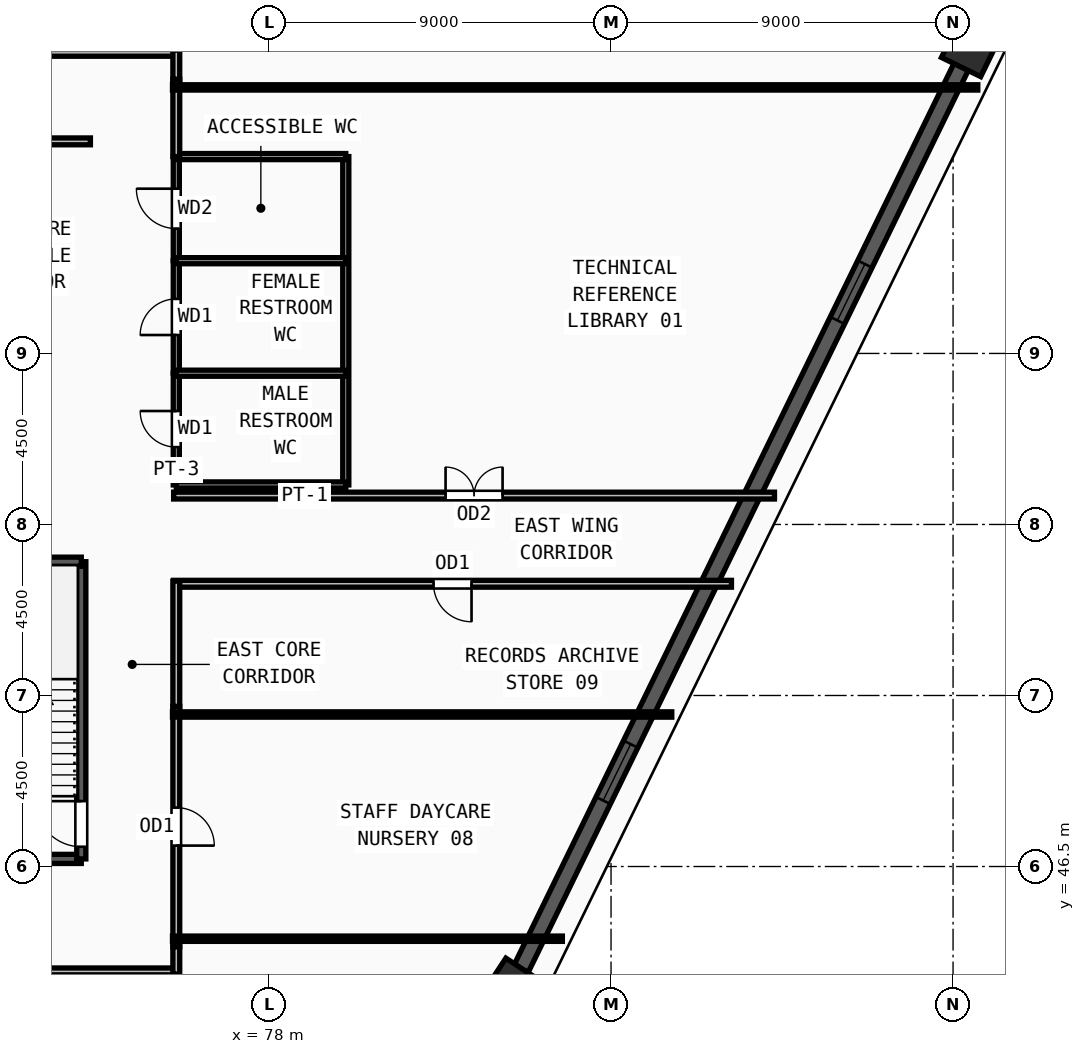
"""IFC4 building model, lengths in metres.
Left out: names, types, materials, properties, quantities, classifications, styles, units other than length and angle.
Written with IfcOpenShell. Run it as: python <this file> out.ifc"""

import sys

from ifc_helpers import new_model, si_unit, direction, frame, frame_2d, origin, origin_2d, place, context, subcontext, project, spatial, rectangle, extrude, source, transform, mapped, element, fill, save


model = new_model("IFC4")
c1 = context("Model", 3, precision=1e-05, world=origin(), true_north=direction((0.0, 1.0)))
c2 = subcontext(c1, "Body", "Model", "MODEL_VIEW")
j1 = project(units=[si_unit("LENGTHUNIT", "METRE"), si_unit("PLANEANGLEUNIT", "RADIAN")], contexts=[c1])
p1 = place(None, origin())
s1 = spatial("IfcSite", under=j1, at=p1, CompositionType="ELEMENT")
p2 = place(p1, origin())
s2 = spatial("IfcBuilding", under=s1, at=p2, CompositionType="ELEMENT")
p3 = place(p2, frame((0.0, 0.0, 113.25)))
s3 = spatial("IfcBuildingStorey", under=s2, at=p3, CompositionType="ELEMENT", Elevation=113.25)
m1 = source(origin(), c2, "Body", "SweptSolid", [
    extrude(rectangle(XDim=1.4, YDim=1.15, at=origin_2d()), origin(), (0.0, 0.0, 1.0), 3.75),
])
for number, where, z_axis, x_axis in (
    (1, (96.518, 68.165, 0.0), (0.0, 0.0, 1.0), (0.439, 0.899, 0.0)),
    (2, (84.329, 43.188, 0.0), (0.0, 0.0, 1.0), (0.549, 0.836, 0.0)),
):
    element("IfcColumn", number, at=place(p3, frame(where, z_axis=z_axis, x_axis=x_axis)), inside=s3, PredefinedType="COLUMN", context=c2, shape_type="MappedRepresentation", body=[
        mapped(m1, transform((0.0, 0.0, 0.0), x_axis=(1.0, 0.0, 0.0), y_axis=(0.0, 1.0, 0.0), z_axis=(0.0, 0.0, 1.0), scale=1.0)),
    ])
p4 = place(p3, frame((84.632, 43.808, 0.0), z_axis=(0.0, 0.0, 1.0), x_axis=(0.43854819507, 0.898707672495, 0.0)))
e3 = element("IfcWall", 3, at=p4, inside=s3, PredefinedType="SOLIDWALL", context=c2, shape_type="SweptSolid", body=[
    extrude(rectangle(XDim=26.412, YDim=0.42, at=frame_2d((13.206, 0.0))), origin(), (0.0, 0.0, 1.0), 3.57),
])
m2 = source(origin(), c2, "Body", "SweptSolid", [
    extrude(rectangle(XDim=1.65, YDim=1.95, at=frame_2d((0.825, 0.975))), frame((0.0, 0.22, 0.0), z_axis=(0.0, -1.0, 0.0), x_axis=(1.0, 0.0, 0.0)), (0.0, 0.0, 1.0), 0.44),
])
p5 = place(p4, frame((4.928, 0.0, 0.55)))
e4 = element("IfcOpeningElement", 4, at=p5, cuts=e3, PredefinedType="OPENING", context=c2, shape_type="MappedRepresentation", body=[
    mapped(m2, transform((0.0, 0.0, 0.0), x_axis=(1.0, 0.0, 0.0), y_axis=(0.0, 1.0, 0.0), z_axis=(0.0, 0.0, 1.0), scale=1.0)),
])
p6 = place(p4, frame((18.984, 0.0, 0.55)))
e5 = element("IfcOpeningElement", 5, at=p6, cuts=e3, PredefinedType="OPENING", context=c2, shape_type="MappedRepresentation", body=[
    mapped(m2, transform((0.0, 0.0, 0.0), x_axis=(1.0, 0.0, 0.0), y_axis=(0.0, 1.0, 0.0), z_axis=(0.0, 0.0, 1.0), scale=1.0)),
])
p7 = place(p3, frame((69.62, 46.7, 0.0), z_axis=(0.0, 0.0, 1.0), x_axis=(1.0, 0.0, 0.0)))
e6 = element("IfcWall", 6, at=p7, inside=s3, PredefinedType="SOLIDWALL", context=c2, shape_type="SweptSolid", body=[
    extrude(rectangle(XDim=3.44, YDim=0.24, at=frame_2d((1.72, 0.0))), origin(), (0.0, 0.0, 1.0), 3.57),
])
p8 = place(p3, frame((73.06, 46.7, 0.0), z_axis=(0.0, 0.0, 1.0), x_axis=(0.0, 1.0, 0.0)))
e7 = element("IfcWall", 7, at=p8, inside=s3, PredefinedType="SOLIDWALL", context=c2, shape_type="SweptSolid", body=[
    extrude(rectangle(XDim=7.82, YDim=0.24, at=frame_2d((3.91, 0.0))), origin(), (0.0, 0.0, 1.0), 3.57),
])
m3 = source(origin(), c2, "Body", "SweptSolid", [
    extrude(rectangle(XDim=1.2, YDim=2.2, at=frame_2d((0.6, 1.1))), frame((0.0, 0.13, 0.0), z_axis=(0.0, -1.0, 0.0), x_axis=(1.0, 0.0, 0.0)), (0.0, 0.0, 1.0), 0.26),
])
p9 = place(p8, frame((0.32, 0.0, 0.0)))
e8 = element("IfcOpeningElement", 8, at=p9, cuts=e7, PredefinedType="OPENING", context=c2, shape_type="MappedRepresentation", body=[
    mapped(m3, transform((0.0, 0.0, 0.0), x_axis=(1.0, 0.0, 0.0), y_axis=(0.0, 1.0, 0.0), z_axis=(0.0, 0.0, 1.0), scale=1.0)),
])
p10 = place(p3, frame((73.06, 54.52, 0.0), z_axis=(0.0, 0.0, 1.0), x_axis=(-1.0, 0.0, 0.0)))
e9 = element("IfcWall", 9, at=p10, inside=s3, PredefinedType="SOLIDWALL", context=c2, shape_type="SweptSolid", body=[
    extrude(rectangle(XDim=3.44, YDim=0.24, at=frame_2d((1.72, 0.0))), origin(), (0.0, 0.0, 1.0), 3.57),
])
p11 = place(p3, frame((75.56, 56.54, 0.0), z_axis=(0.0, 0.0, 1.0), x_axis=(0.0, 1.0, 0.0)))
e10 = element("IfcWall", 10, at=p11, inside=s3, PredefinedType="PARTITIONING", context=c2, shape_type="SweptSolid", body=[
    extrude(rectangle(XDim=2.94, YDim=0.16, at=frame_2d((1.47, 0.0))), origin(), (0.0, 0.0, 1.0), 3.57),
])
m4 = source(origin(), c2, "Body", "SweptSolid", [
    extrude(rectangle(XDim=0.95, YDim=2.15, at=frame_2d((0.475, 1.075))), frame((0.0, 0.09, 0.0), z_axis=(0.0, -1.0, 0.0), x_axis=(1.0, 0.0, 0.0)), (0.0, 0.0, 1.0), 0.18),
])
p12 = place(p11, frame((0.995, 0.0, 0.0)))
e11 = element("IfcOpeningElement", 11, at=p12, cuts=e10, PredefinedType="OPENING", context=c2, shape_type="MappedRepresentation", body=[
    mapped(m4, transform((0.0, 0.0, 0.0), x_axis=(1.0, 0.0, 0.0), y_axis=(0.0, 1.0, 0.0), z_axis=(0.0, 0.0, 1.0), scale=1.0)),
])
p13 = place(p3, frame((75.56, 59.48, 0.0), z_axis=(0.0, 0.0, 1.0), x_axis=(0.0, 1.0, 0.0)))
e12 = element("IfcWall", 12, at=p13, inside=s3, PredefinedType="PARTITIONING", context=c2, shape_type="SweptSolid", body=[
    extrude(rectangle(XDim=2.96, YDim=0.16, at=frame_2d((1.48, 0.0))), origin(), (0.0, 0.0, 1.0), 3.57),
])
p14 = place(p13, frame((1.005, 0.0, 0.0)))
e13 = element("IfcOpeningElement", 13, at=p14, cuts=e12, PredefinedType="OPENING", context=c2, shape_type="MappedRepresentation", body=[
    mapped(m4, transform((0.0, 0.0, 0.0), x_axis=(1.0, 0.0, 0.0), y_axis=(0.0, 1.0, 0.0), z_axis=(0.0, 0.0, 1.0), scale=1.0)),
])
p15 = place(p3, frame((75.56, 62.44, 0.0), z_axis=(0.0, 0.0, 1.0), x_axis=(0.0, 1.0, 0.0)))
e14 = element("IfcWall", 14, at=p15, inside=s3, PredefinedType="PARTITIONING", context=c2, shape_type="SweptSolid", body=[
    extrude(rectangle(XDim=2.74, YDim=0.16, at=frame_2d((1.37, 0.0))), origin(), (0.0, 0.0, 1.0), 3.57),
])
m5 = source(origin(), c2, "Body", "SweptSolid", [
    extrude(rectangle(XDim=1.05, YDim=2.15, at=frame_2d((0.525, 1.075))), frame((0.0, 0.09, 0.0), z_axis=(0.0, -1.0, 0.0), x_axis=(1.0, 0.0, 0.0)), (0.0, 0.0, 1.0), 0.18),
])
p16 = place(p15, frame((0.845, 0.0, 0.0)))
e15 = element("IfcOpeningElement", 15, at=p16, cuts=e14, PredefinedType="OPENING", context=c2, shape_type="MappedRepresentation", body=[
    mapped(m5, transform((0.0, 0.0, 0.0), x_axis=(1.0, 0.0, 0.0), y_axis=(0.0, 1.0, 0.0), z_axis=(0.0, 0.0, 1.0), scale=1.0)),
])
p17 = place(p3, frame((69.46, 65.58, 0.0), z_axis=(0.0, 0.0, 1.0), x_axis=(1.0, 0.0, 0.0)))
e16 = element("IfcWall", 16, at=p17, inside=s3, PredefinedType="PARTITIONING", context=c2, shape_type="SweptSolid", body=[
    extrude(rectangle(XDim=3.84, YDim=0.18, at=frame_2d((1.92, 0.0))), origin(), (0.0, 0.0, 1.0), 3.57),
])
m6 = source(origin(), c2, "Body", "SweptSolid", [
    extrude(rectangle(XDim=1.3, YDim=2.2, at=frame_2d((0.65, 1.1))), frame((0.0, 0.1, 0.0), z_axis=(0.0, -1.0, 0.0), x_axis=(1.0, 0.0, 0.0)), (0.0, 0.0, 1.0), 0.2),
])
p18 = place(p17, frame((1.27, 0.0, 0.0)))
e17 = element("IfcOpeningElement", 17, at=p18, cuts=e16, PredefinedType="OPENING", context=c2, shape_type="MappedRepresentation", body=[
    mapped(m6, transform((0.0, 0.0, 0.0), x_axis=(1.0, 0.0, 0.0), y_axis=(0.0, 1.0, 0.0), z_axis=(0.0, 0.0, 1.0), scale=1.0)),
])
p19 = place(p3, frame((75.49, 56.26, 0.0), z_axis=(0.0, 0.0, 1.0), x_axis=(1.0, 0.0, 0.0)))
e18 = element("IfcWall", 18, at=p19, inside=s3, PredefinedType="PARTITIONING", context=c2, shape_type="SweptSolid", body=[
    extrude(rectangle(XDim=15.811, YDim=0.18, at=frame_2d((7.906, 0.0))), origin(), (0.0, 0.0, 1.0), 3.57),
])
m7 = source(origin(), c2, "Body", "SweptSolid", [
    extrude(rectangle(XDim=1.5, YDim=2.2, at=frame_2d((0.75, 1.1))), frame((0.0, 0.1, 0.0), z_axis=(0.0, -1.0, 0.0), x_axis=(1.0, 0.0, 0.0)), (0.0, 0.0, 1.0), 0.2),
])
p20 = place(p19, frame((7.156, 0.0, 0.0)))
e19 = element("IfcOpeningElement", 19, at=p20, cuts=e18, PredefinedType="OPENING", context=c2, shape_type="MappedRepresentation", body=[
    mapped(m7, transform((0.0, 0.0, 0.0), x_axis=(1.0, 0.0, 0.0), y_axis=(0.0, 1.0, 0.0), z_axis=(0.0, 0.0, 1.0), scale=1.0)),
])
p21 = place(p3, frame((57.785, 67.91, 0.0), z_axis=(0.0, 0.0, 1.0), x_axis=(1.0, 0.0, 0.0)))
e20 = element("IfcWall", 20, at=p21, inside=s3, PredefinedType="PARTITIONING", context=c2, shape_type="SweptSolid", body=[
    extrude(rectangle(XDim=17.845, YDim=0.18, at=frame_2d((8.922, 0.0))), origin(), (0.0, 0.0, 1.0), 3.57),
])
p22 = place(p21, frame((8.172, 0.0, 0.0)))
e21 = element("IfcOpeningElement", 21, at=p22, cuts=e20, PredefinedType="OPENING", context=c2, shape_type="MappedRepresentation", body=[
    mapped(m7, transform((0.0, 0.0, 0.0), x_axis=(1.0, 0.0, 0.0), y_axis=(0.0, 1.0, 0.0), z_axis=(0.0, 0.0, 1.0), scale=1.0)),
])
p23 = place(p3, frame((75.63, 43.74, 0.0), z_axis=(0.0, 0.0, 1.0), x_axis=(-1.0, 0.0, 0.0)))
e22 = element("IfcWall", 22, at=p23, inside=s3, PredefinedType="PARTITIONING", context=c2, shape_type="SweptSolid", body=[
    extrude(rectangle(XDim=31.26, YDim=0.18, at=frame_2d((15.63, 0.0))), origin(), (0.0, 0.0, 1.0), 3.57),
])
p24 = place(p23, frame((10.08, 0.0, 0.0)))
e23 = element("IfcOpeningElement", 23, at=p24, cuts=e22, PredefinedType="OPENING", context=c2, shape_type="MappedRepresentation", body=[
    mapped(m7, transform((0.0, 0.0, 0.0), x_axis=(1.0, 0.0, 0.0), y_axis=(0.0, 1.0, 0.0), z_axis=(0.0, 0.0, 1.0), scale=1.0)),
])
p25 = place(p3, frame((75.56, 50.715, 0.0), z_axis=(0.0, 0.0, 1.0), x_axis=(0.0, -1.0, 0.0)))
e24 = element("IfcWall", 24, at=p25, inside=s3, PredefinedType="PARTITIONING", context=c2, shape_type="SweptSolid", body=[
    extrude(rectangle(XDim=6.33, YDim=0.18, at=frame_2d((3.165, 0.0))), origin(), (0.0, 0.0, 1.0), 3.155),
])
m8 = source(origin(), c2, "Body", "SweptSolid", [
    extrude(rectangle(XDim=1.0, YDim=2.2, at=frame_2d((0.5, 1.1))), frame((0.0, 0.1, 0.0), z_axis=(0.0, -1.0, 0.0), x_axis=(1.0, 0.0, 0.0)), (0.0, 0.0, 1.0), 0.2),
])
p26 = place(p25, frame((2.665, 0.0, 0.0)))
e25 = element("IfcOpeningElement", 25, at=p26, cuts=e24, PredefinedType="OPENING", context=c2, shape_type="MappedRepresentation", body=[
    mapped(m8, transform((0.0, 0.0, 0.0), x_axis=(1.0, 0.0, 0.0), y_axis=(0.0, 1.0, 0.0), z_axis=(0.0, 0.0, 1.0), scale=1.0)),
])
p27 = place(p3, frame((90.169, 53.94, 0.0), z_axis=(0.0, 0.0, 1.0), x_axis=(-1.0, 0.0, 0.0)))
e26 = element("IfcWall", 26, at=p27, inside=s3, PredefinedType="PARTITIONING", context=c2, shape_type="SweptSolid", body=[
    extrude(rectangle(XDim=14.679, YDim=0.18, at=frame_2d((7.339, 0.0))), origin(), (0.0, 0.0, 1.0), 3.57),
])
p28 = place(p27, frame((6.84, 0.0, 0.0)))
e27 = element("IfcOpeningElement", 27, at=p28, cuts=e26, PredefinedType="OPENING", context=c2, shape_type="MappedRepresentation", body=[
    mapped(m8, transform((0.0, 0.0, 0.0), x_axis=(1.0, 0.0, 0.0), y_axis=(0.0, 1.0, 0.0), z_axis=(0.0, 0.0, 1.0), scale=1.0)),
])
p29 = place(p3, frame((80.02, 56.54, 0.0), z_axis=(0.0, 0.0, 1.0), x_axis=(0.0, 1.0, 0.0)))
e28 = element("IfcWall", 28, at=p29, inside=s3, PredefinedType="PARTITIONING", context=c2, shape_type="SweptSolid", body=[
    extrude(rectangle(XDim=8.64, YDim=0.16, at=frame_2d((4.32, 0.0))), origin(), (0.0, 0.0, 1.0), 3.155),
])
for number, where, z_axis, x_axis in (
    (29, (75.56, 56.54, 0.0), (0.0, 0.0, 1.0), (1.0, 0.0, 0.0)),
    (30, (75.56, 59.48, 0.0), (0.0, 0.0, 1.0), (1.0, 0.0, 0.0)),
    (31, (75.56, 62.44, 0.0), (0.0, 0.0, 1.0), (1.0, 0.0, 0.0)),
    (32, (75.56, 65.18, 0.0), (0.0, 0.0, 1.0), (1.0, 0.0, 0.0)),
):
    element("IfcWall", number, at=place(p3, frame(where, z_axis=z_axis, x_axis=x_axis)), inside=s3, PredefinedType="PARTITIONING", context=c2, shape_type="SweptSolid", body=[
        extrude(rectangle(XDim=4.46, YDim=0.16, at=frame_2d((2.23, 0.0))), origin(), (0.0, 0.0, 1.0), 3.57),
    ])
p30 = place(p3, frame((75.56, 67.215, 0.0), z_axis=(0.0, 0.0, 1.0), x_axis=(0.0, -1.0, 0.0)))
e33 = element("IfcWall", 33, at=p30, inside=s3, PredefinedType="PARTITIONING", context=c2, shape_type="SweptSolid", body=[
    extrude(rectangle(XDim=2.035, YDim=0.18, at=frame_2d((1.018, 0.0))), origin(), (0.0, 0.0, 1.0), 3.57),
])
p31 = place(p3, frame((75.56, 67.98, 0.0), z_axis=(0.0, 0.0, 1.0), x_axis=(0.0, -1.0, 0.0)))
e34 = element("IfcWall", 34, at=p31, inside=s3, PredefinedType="PARTITIONING", context=c2, shape_type="SweptSolid", body=[
    extrude(rectangle(XDim=0.765, YDim=0.18, at=frame_2d((0.382, 0.0))), origin(), (0.0, 0.0, 1.0), 3.57),
])
p32 = place(p3, frame((75.56, 44.385, 0.0), z_axis=(0.0, 0.0, 1.0), x_axis=(0.0, -1.0, 0.0)))
e35 = element("IfcWall", 35, at=p32, inside=s3, PredefinedType="PARTITIONING", context=c2, shape_type="SweptSolid", body=[
    extrude(rectangle(XDim=0.715, YDim=0.18, at=frame_2d((0.357, 0.0))), origin(), (0.0, 0.0, 1.0), 3.57),
])
p33 = place(p3, frame((75.56, 54.01, 0.0), z_axis=(0.0, 0.0, 1.0), x_axis=(0.0, -1.0, 0.0)))
e36 = element("IfcWall", 36, at=p33, inside=s3, PredefinedType="PARTITIONING", context=c2, shape_type="SweptSolid", body=[
    extrude(rectangle(XDim=3.295, YDim=0.18, at=frame_2d((1.647, 0.0))), origin(), (0.0, 0.0, 1.0), 3.57),
])
p34 = place(p3, frame((75.46, 44.6, 0.0), z_axis=(0.0, 0.0, 1.0), x_axis=(1.0, 0.0, 0.0)))
e37 = element("IfcWall", 37, at=p34, inside=s3, PredefinedType="PARTITIONING", context=c2, shape_type="SweptSolid", body=[
    extrude(rectangle(XDim=10.259, YDim=0.14, at=frame_2d((5.129, 0.0))), origin(), (0.0, 0.0, 1.0), 3.57),
])
p35 = place(p3, frame((75.46, 50.5, 0.0), z_axis=(0.0, 0.0, 1.0), x_axis=(1.0, 0.0, 0.0)))
e38 = element("IfcWall", 38, at=p35, inside=s3, PredefinedType="PARTITIONING", context=c2, shape_type="SweptSolid", body=[
    extrude(rectangle(XDim=13.138, YDim=0.14, at=frame_2d((6.569, 0.0))), origin(), (0.0, 0.0, 1.0), 3.57),
])
p36 = place(p3, frame((75.46, 67.0, 0.0), z_axis=(0.0, 0.0, 1.0), x_axis=(1.0, 0.0, 0.0)))
e39 = element("IfcWall", 39, at=p36, inside=s3, PredefinedType="PARTITIONING", context=c2, shape_type="SweptSolid", body=[
    extrude(rectangle(XDim=21.191, YDim=0.14, at=frame_2d((10.595, 0.0))), origin(), (0.0, 0.0, 1.0), 2.755),
])
m9 = source(origin(), c2, "Body", "SweptSolid", [
    extrude(rectangle(XDim=1.65, YDim=1.95, at=frame_2d((0.825, 0.975))), frame((0.0, 0.03, 0.0), z_axis=(0.0, -1.0, 0.0), x_axis=(1.0, 0.0, 0.0)), (0.0, 0.0, 1.0), 0.06),
])
p37 = place(p5, origin())
e40 = element("IfcWindow", 40, at=p37, inside=s3, PartitioningType="DOUBLE_PANEL_VERTICAL", PredefinedType="WINDOW", context=c2, shape_type="MappedRepresentation", body=[
    mapped(m9, transform((0.0, 0.0, 0.0), x_axis=(1.0, 0.0, 0.0), y_axis=(0.0, 1.0, 0.0), z_axis=(0.0, 0.0, 1.0), scale=1.0)),
])
fill(e4, e40)
p38 = place(p6, origin())
e41 = element("IfcWindow", 41, at=p38, inside=s3, PartitioningType="DOUBLE_PANEL_VERTICAL", PredefinedType="WINDOW", context=c2, shape_type="MappedRepresentation", body=[
    mapped(m9, transform((0.0, 0.0, 0.0), x_axis=(1.0, 0.0, 0.0), y_axis=(0.0, 1.0, 0.0), z_axis=(0.0, 0.0, 1.0), scale=1.0)),
])
fill(e5, e41)
m10 = source(origin(), c2, "Body", "SweptSolid", [
    extrude(rectangle(XDim=1.2, YDim=2.2, at=frame_2d((0.6, 1.1))), frame((0.0, 0.025, 0.0), z_axis=(0.0, -1.0, 0.0), x_axis=(1.0, 0.0, 0.0)), (0.0, 0.0, 1.0), 0.05),
])
p39 = place(p9, origin())
e42 = element("IfcDoor", 42, at=p39, inside=s3, OperationType="SINGLE_SWING_RIGHT", PredefinedType="DOOR", context=c2, shape_type="MappedRepresentation", body=[
    mapped(m10, transform((0.0, 0.0, 0.0), x_axis=(1.0, 0.0, 0.0), y_axis=(0.0, 1.0, 0.0), z_axis=(0.0, 0.0, 1.0), scale=1.0)),
])
fill(e8, e42)
m11 = source(origin(), c2, "Body", "SweptSolid", [
    extrude(rectangle(XDim=0.95, YDim=2.15, at=frame_2d((0.475, 1.075))), frame((0.0, 0.025, 0.0), z_axis=(0.0, -1.0, 0.0), x_axis=(1.0, 0.0, 0.0)), (0.0, 0.0, 1.0), 0.05),
])
p40 = place(p12, origin())
e43 = element("IfcDoor", 43, at=p40, inside=s3, OperationType="SINGLE_SWING_RIGHT", PredefinedType="DOOR", context=c2, shape_type="MappedRepresentation", body=[
    mapped(m11, transform((0.0, 0.0, 0.0), x_axis=(1.0, 0.0, 0.0), y_axis=(0.0, 1.0, 0.0), z_axis=(0.0, 0.0, 1.0), scale=1.0)),
])
fill(e11, e43)
p41 = place(p14, origin())
e44 = element("IfcDoor", 44, at=p41, inside=s3, OperationType="SINGLE_SWING_LEFT", PredefinedType="DOOR", context=c2, shape_type="MappedRepresentation", body=[
    mapped(m11, transform((0.0, 0.0, 0.0), x_axis=(1.0, 0.0, 0.0), y_axis=(0.0, 1.0, 0.0), z_axis=(0.0, 0.0, 1.0), scale=1.0)),
])
fill(e13, e44)
m12 = source(origin(), c2, "Body", "SweptSolid", [
    extrude(rectangle(XDim=1.05, YDim=2.15, at=frame_2d((0.525, 1.075))), frame((0.0, 0.025, 0.0), z_axis=(0.0, -1.0, 0.0), x_axis=(1.0, 0.0, 0.0)), (0.0, 0.0, 1.0), 0.05),
])
p42 = place(p16, origin())
e45 = element("IfcDoor", 45, at=p42, inside=s3, OperationType="SINGLE_SWING_RIGHT", PredefinedType="DOOR", context=c2, shape_type="MappedRepresentation", body=[
    mapped(m12, transform((0.0, 0.0, 0.0), x_axis=(1.0, 0.0, 0.0), y_axis=(0.0, 1.0, 0.0), z_axis=(0.0, 0.0, 1.0), scale=1.0)),
])
fill(e15, e45)
m13 = source(origin(), c2, "Body", "SweptSolid", [
    extrude(rectangle(XDim=1.5, YDim=2.2, at=frame_2d((0.75, 1.1))), frame((0.0, 0.025, 0.0), z_axis=(0.0, -1.0, 0.0), x_axis=(1.0, 0.0, 0.0)), (0.0, 0.0, 1.0), 0.05),
])
p43 = place(p20, origin())
e46 = element("IfcDoor", 46, at=p43, inside=s3, OperationType="DOUBLE_DOOR_SINGLE_SWING", PredefinedType="DOOR", context=c2, shape_type="MappedRepresentation", body=[
    mapped(m13, transform((0.0, 0.0, 0.0), x_axis=(1.0, 0.0, 0.0), y_axis=(0.0, 1.0, 0.0), z_axis=(0.0, 0.0, 1.0), scale=1.0)),
])
fill(e19, e46)
m14 = source(origin(), c2, "Body", "SweptSolid", [
    extrude(rectangle(XDim=1.0, YDim=2.2, at=frame_2d((0.5, 1.1))), frame((0.0, 0.025, 0.0), z_axis=(0.0, -1.0, 0.0), x_axis=(1.0, 0.0, 0.0)), (0.0, 0.0, 1.0), 0.05),
])
p44 = place(p26, origin())
e47 = element("IfcDoor", 47, at=p44, inside=s3, OperationType="SINGLE_SWING_RIGHT", PredefinedType="DOOR", context=c2, shape_type="MappedRepresentation", body=[
    mapped(m14, transform((0.0, 0.0, 0.0), x_axis=(1.0, 0.0, 0.0), y_axis=(0.0, 1.0, 0.0), z_axis=(0.0, 0.0, 1.0), scale=1.0)),
])
fill(e25, e47)
p45 = place(p28, origin())
e48 = element("IfcDoor", 48, at=p45, inside=s3, OperationType="SINGLE_SWING_LEFT", PredefinedType="DOOR", context=c2, shape_type="MappedRepresentation", body=[
    mapped(m14, transform((0.0, 0.0, 0.0), x_axis=(1.0, 0.0, 0.0), y_axis=(0.0, 1.0, 0.0), z_axis=(0.0, 0.0, 1.0), scale=1.0)),
])
fill(e27, e48)
save(model, sys.argv[1])
